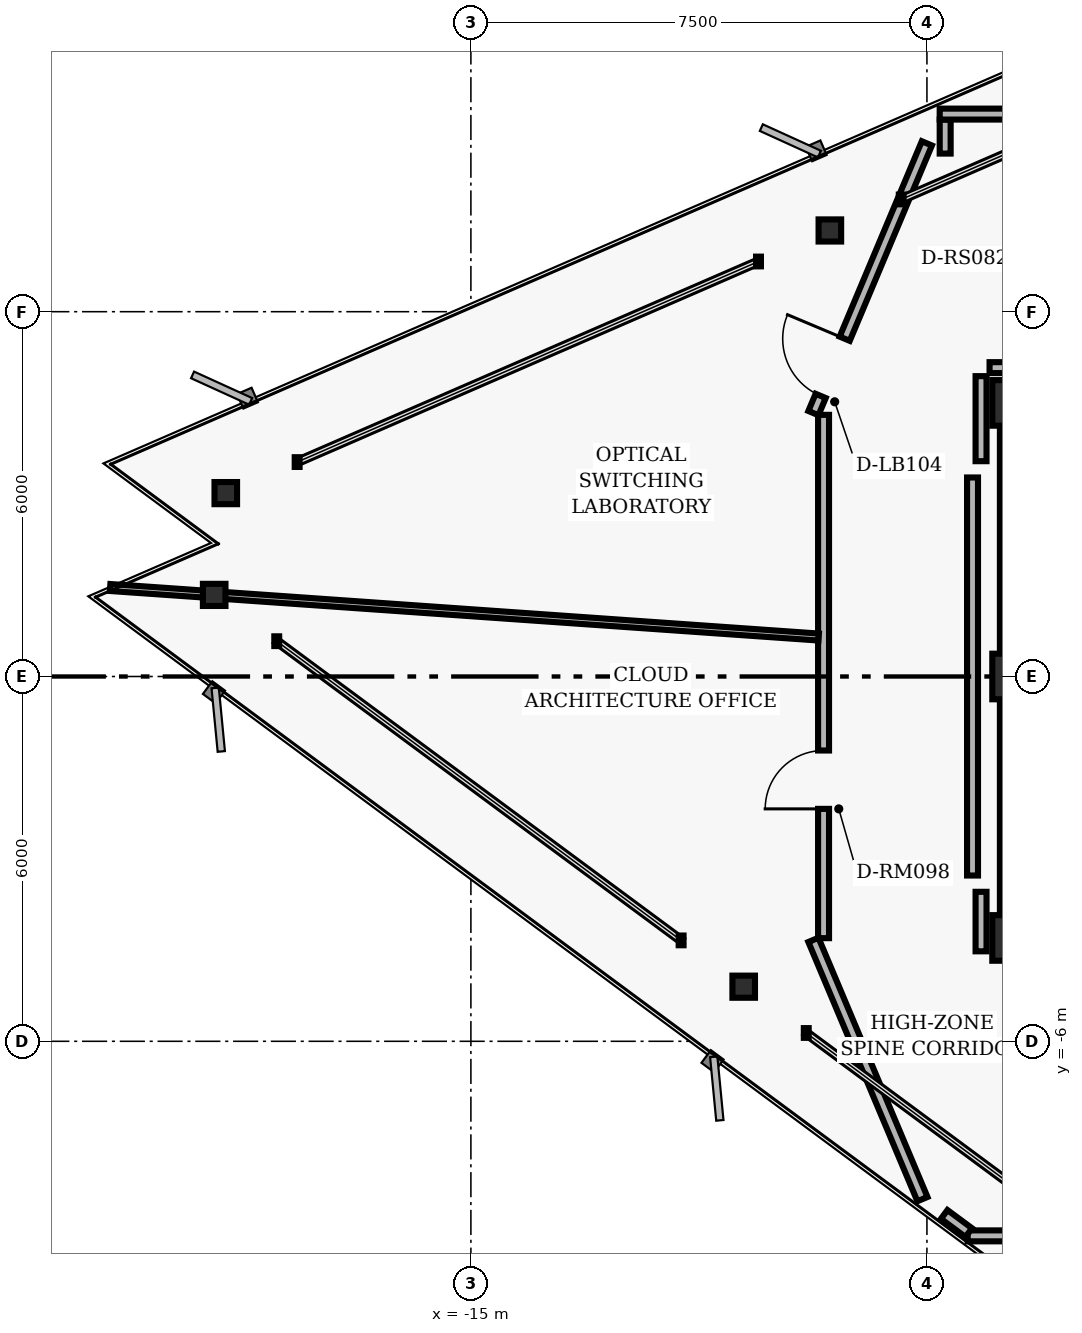
"""IFC4 building model, lengths in metres.
Left out: names, types, materials, properties, quantities, classifications, styles, units other than length and angle.
Written with IfcOpenShell. Run it as: python <this file> out.ifc"""

import sys

from ifc_helpers import new_model, si_unit, direction, frame, frame_2d, origin, origin_2d, place, context, subcontext, project, spatial, rectangle, hollow_rectangle, i_section, extrude, element, fill, save


model = new_model("IFC4")
c1 = context("Model", 3, precision=1e-05, world=origin(), true_north=direction((0.0, 1.0)))
c2 = subcontext(c1, "Body", "Model", "MODEL_VIEW")
j1 = project(units=[si_unit("LENGTHUNIT", "METRE"), si_unit("PLANEANGLEUNIT", "RADIAN")], contexts=[c1])
p1 = place(None, origin())
s1 = spatial("IfcSite", under=j1, at=p1, CompositionType="ELEMENT")
p2 = place(p1, origin())
s2 = spatial("IfcBuilding", under=s1, at=p2, CompositionType="ELEMENT")
p3 = place(p2, frame((0.0, 0.0, 236.16)))
s3 = spatial("IfcBuildingStorey", under=s2, at=p3, CompositionType="ELEMENT", Elevation=236.16)
for number, where, z_axis, x_axis in (
    (1, (-6.05, 4.5, 0.0), (0.0, 0.0, 1.0), (1.0, 0.0, 0.0)),
    (2, (-6.05, 0.0, 0.0), (0.0, 0.0, 1.0), (1.0, 0.0, 0.0)),
    (3, (-6.05, -4.3, 0.0), (0.0, 0.0, 1.0), (1.0, 0.0, 0.0)),
):
    element("IfcColumn", number, at=place(p3, frame(where, z_axis=z_axis, x_axis=x_axis)), inside=s3, PredefinedType="COLUMN", context=c2, shape_type="SweptSolid", body=[
        extrude(hollow_rectangle(XDim=0.75, YDim=0.75, WallThickness=0.05, InnerFilletRadius=0.02, OuterFilletRadius=0.04, at=origin_2d()), origin(), (0.0, 0.0, 1.0), 3.04),
    ])
p4 = place(p3, frame((-6.05, 0.375, 0.0), z_axis=(0.0, 0.0, 1.0), x_axis=(0.0, 1.0, 0.0)))
e4 = element("IfcWall", 4, at=p4, inside=s3, PredefinedType="SHEAR", context=c2, shape_type="SweptSolid", body=[
    extrude(rectangle(XDim=3.75, YDim=0.5, at=frame_2d((1.875, 0.0))), origin(), (0.0, 0.0, 1.0), 2.618),
])
p5 = place(p3, frame((-6.05, -3.925, 0.0), z_axis=(0.0, 0.0, 1.0), x_axis=(0.0, 1.0, 0.0)))
e5 = element("IfcWall", 5, at=p5, inside=s3, PredefinedType="SHEAR", context=c2, shape_type="SweptSolid", body=[
    extrude(rectangle(XDim=3.55, YDim=0.5, at=frame_2d((1.775, 0.0))), origin(), (0.0, 0.0, 1.0), 2.618),
])
for number, where, z_axis, x_axis in (
    (6, (-9.096, 7.336, 0.0), (0.0, 0.0, 1.0), (1.0, 0.0, 0.0)),
    (7, (-19.031, 3.016, 0.0), (0.0, 0.0, 1.0), (1.0, 0.0, 0.0)),
    (8, (-19.222, 1.342, 0.0), (0.0, 0.0, 1.0), (1.0, 0.0, 0.0)),
    (9, (-10.513, -5.102, 0.0), (0.0, 0.0, 1.0), (1.0, 0.0, 0.0)),
):
    element("IfcColumn", number, at=place(p3, frame(where, z_axis=z_axis, x_axis=x_axis)), inside=s3, PredefinedType="COLUMN", context=c2, shape_type="SweptSolid", body=[
        extrude(i_section(OverallWidth=0.371, OverallDepth=0.364, WebThickness=0.013, FlangeThickness=0.022, FilletRadius=0.015, at=origin_2d()), origin(), (0.0, 0.0, 1.0), 3.04),
    ])
p6 = place(p3, frame((-7.574, -8.596, 0.0), z_axis=(0.0, 0.0, 1.0), x_axis=(-0.38757793583, 0.921836939842, 0.0)))
e10 = element("IfcWall", 10, at=p6, inside=s3, PredefinedType="PARTITIONING", context=c2, shape_type="SweptSolid", body=[
    extrude(rectangle(XDim=4.625, YDim=0.18, at=frame_2d((2.313, 0.0))), origin(), (0.0, 0.0, 1.0), 2.593),
])
p7 = place(p3, frame((-9.2, -4.303, 0.0), z_axis=(0.0, 0.0, 1.0), x_axis=(0.0, 1.0, 0.0)))
e11 = element("IfcWall", 11, at=p7, inside=s3, PredefinedType="PARTITIONING", context=c2, shape_type="SweptSolid", body=[
    extrude(rectangle(XDim=8.607, YDim=0.18, at=frame_2d((4.303, 0.0))), origin(), (0.0, 0.0, 1.0), 2.593),
])
p8 = place(p7, frame((2.126, 0.0, 0.0)))
e12 = element("IfcOpeningElement", 12, at=p8, cuts=e11, PredefinedType="OPENING", context=c2, shape_type="SweptSolid", body=[
    extrude(rectangle(XDim=0.96, YDim=2.02, at=frame_2d((0.48, 1.01))), frame((0.0, 0.1, 0.0), z_axis=(0.0, -1.0, 0.0), x_axis=(1.0, 0.0, 0.0)), (0.0, 0.0, 1.0), 0.2),
])
p9 = place(p3, frame((-9.367, 4.332, 0.0), z_axis=(0.0, 0.0, 1.0), x_axis=(0.387573945081, 0.921838617706, 0.0)))
e13 = element("IfcWall", 13, at=p9, inside=s3, PredefinedType="PARTITIONING", context=c2, shape_type="SweptSolid", body=[
    extrude(rectangle(XDim=4.813, YDim=0.18, at=frame_2d((2.407, 0.0))), origin(), (0.0, 0.0, 1.0), 2.593),
])
p10 = place(p9, frame((0.307, 0.0, 0.0)))
e14 = element("IfcOpeningElement", 14, at=p10, cuts=e13, PredefinedType="OPENING", context=c2, shape_type="SweptSolid", body=[
    extrude(rectangle(XDim=1.02, YDim=2.02, at=frame_2d((0.51, 1.01))), frame((0.0, 0.1, 0.0), z_axis=(0.0, -1.0, 0.0), x_axis=(1.0, 0.0, 0.0)), (0.0, 0.0, 1.0), 0.2),
])
p11 = place(p3, frame((-7.2, 8.601, 0.0), z_axis=(0.0, 0.0, 1.0), x_axis=(0.0, 1.0, 0.0)))
e15 = element("IfcWall", 15, at=p11, inside=s3, PredefinedType="PARTITIONING", context=c2, shape_type="SweptSolid", body=[
    extrude(rectangle(XDim=0.559, YDim=0.18, at=frame_2d((0.28, 0.0))), origin(), (0.0, 0.0, 1.0), 2.593),
])
p12 = place(p3, frame((-7.29, 9.25, 0.0), z_axis=(0.0, 0.0, 1.0), x_axis=(1.0, 0.0, 0.0)))
e16 = element("IfcWall", 16, at=p12, inside=s3, PredefinedType="PARTITIONING", context=c2, shape_type="SweptSolid", body=[
    extrude(rectangle(XDim=13.3, YDim=0.18, at=frame_2d((6.65, 0.0))), origin(), (0.0, 0.0, 1.0), 2.215),
])
p13 = place(p12, frame((8.17, 0.0, 0.0)))
e17 = element("IfcOpeningElement", 17, at=p13, cuts=e16, PredefinedType="OPENING", context=c2, shape_type="SweptSolid", body=[
    extrude(rectangle(XDim=0.96, YDim=2.02, at=frame_2d((0.48, 1.01))), frame((0.0, 0.1, 0.0), z_axis=(0.0, -1.0, 0.0), x_axis=(1.0, 0.0, 0.0)), (0.0, 0.0, 1.0), 0.2),
])
p14 = place(p3, frame((-5.881, 5.08, 0.0), z_axis=(0.0, 0.0, 1.0), x_axis=(-1.0, 0.0, 0.0)))
e18 = element("IfcWall", 18, at=p14, inside=s3, PredefinedType="PARTITIONING", context=c2, shape_type="SweptSolid", body=[
    extrude(rectangle(XDim=0.589, YDim=0.18, at=frame_2d((0.294, 0.0))), origin(), (0.0, 0.0, 1.0), 2.593),
])
p15 = place(p3, frame((-6.61, 4.94, 0.0), z_axis=(0.0, 0.0, 1.0), x_axis=(0.0, -1.0, 0.0)))
e19 = element("IfcWall", 19, at=p15, inside=s3, PredefinedType="PARTITIONING", context=c2, shape_type="SweptSolid", body=[
    extrude(rectangle(XDim=1.399, YDim=0.18, at=frame_2d((0.699, 0.0))), origin(), (0.0, 0.0, 1.0), 2.593),
])
p16 = place(p3, frame((-6.75, 3.273, 0.0), z_axis=(0.0, 0.0, 1.0), x_axis=(0.0, -1.0, 0.0)))
e20 = element("IfcWall", 20, at=p16, inside=s3, PredefinedType="PARTITIONING", context=c2, shape_type="SweptSolid", body=[
    extrude(rectangle(XDim=6.547, YDim=0.18, at=frame_2d((3.273, 0.0))), origin(), (0.0, 0.0, 1.0), 2.593),
])
p17 = place(p3, frame((-6.61, -3.541, 0.0), z_axis=(0.0, 0.0, 1.0), x_axis=(0.0, -1.0, 0.0)))
e21 = element("IfcWall", 21, at=p17, inside=s3, PredefinedType="PARTITIONING", context=c2, shape_type="SweptSolid", body=[
    extrude(rectangle(XDim=0.979, YDim=0.18, at=frame_2d((0.489, 0.0))), origin(), (0.0, 0.0, 1.0), 2.593),
])
p18 = place(p3, frame((6.01, -9.2, 0.0), z_axis=(0.0, 0.0, 1.0), x_axis=(-1.0, 0.0, 0.0)))
e22 = element("IfcWall", 22, at=p18, inside=s3, PredefinedType="PARTITIONING", context=c2, shape_type="SweptSolid", body=[
    extrude(rectangle(XDim=12.84, YDim=0.18, at=frame_2d((6.42, 0.0))), origin(), (0.0, 0.0, 1.0), 2.593),
])
p19 = place(p18, frame((5.124, 0.0, 0.0)))
e23 = element("IfcOpeningElement", 23, at=p19, cuts=e22, PredefinedType="OPENING", context=c2, shape_type="SweptSolid", body=[
    extrude(rectangle(XDim=0.96, YDim=2.02, at=frame_2d((0.48, 1.01))), frame((0.0, 0.1, 0.0), z_axis=(0.0, -1.0, 0.0), x_axis=(1.0, 0.0, 0.0)), (0.0, 0.0, 1.0), 0.2),
])
p20 = place(p3, frame((-6.812, -9.146, 0.0), z_axis=(0.0, 0.0, 1.0), x_axis=(-0.803893055119, 0.594773869577, 0.0)))
e24 = element("IfcWall", 24, at=p20, inside=s3, PredefinedType="PARTITIONING", context=c2, shape_type="SweptSolid", body=[
    extrude(rectangle(XDim=0.502, YDim=0.18, at=frame_2d((0.251, 0.0))), origin(), (0.0, 0.0, 1.0), 2.593),
])
p21 = place(p3, frame((-9.28, 0.649, 0.0), z_axis=(0.0, 0.0, 1.0), x_axis=(-0.997563579993, 0.069763198551, 0.0)))
e25 = element("IfcWall", 25, at=p21, inside=s3, PredefinedType="MOVABLE", context=c2, shape_type="SweptSolid", body=[
    extrude(rectangle(XDim=11.682, YDim=0.115, at=frame_2d((5.841, 0.0))), origin(), (0.0, 0.0, 1.0), 2.073),
])
p22 = place(p8, origin())
e26 = element("IfcDoor", 26, at=p22, inside=s3, OperationType="SINGLE_SWING_LEFT", PredefinedType="DOOR", context=c2, shape_type="SweptSolid", body=[
    extrude(rectangle(XDim=0.96, YDim=2.02, at=frame_2d((0.48, 1.01))), frame((0.0, 0.025, 0.0), z_axis=(0.0, -1.0, 0.0), x_axis=(1.0, 0.0, 0.0)), (0.0, 0.0, 1.0), 0.05),
])
fill(e12, e26)
p23 = place(p10, origin())
e27 = element("IfcDoor", 27, at=p23, inside=s3, OperationType="SINGLE_SWING_RIGHT", PredefinedType="DOOR", context=c2, shape_type="SweptSolid", body=[
    extrude(rectangle(XDim=1.02, YDim=2.02, at=frame_2d((0.51, 1.01))), frame((0.0, 0.025, 0.0), z_axis=(0.0, -1.0, 0.0), x_axis=(1.0, 0.0, 0.0)), (0.0, 0.0, 1.0), 0.05),
])
fill(e14, e27)
save(model, sys.argv[1])
